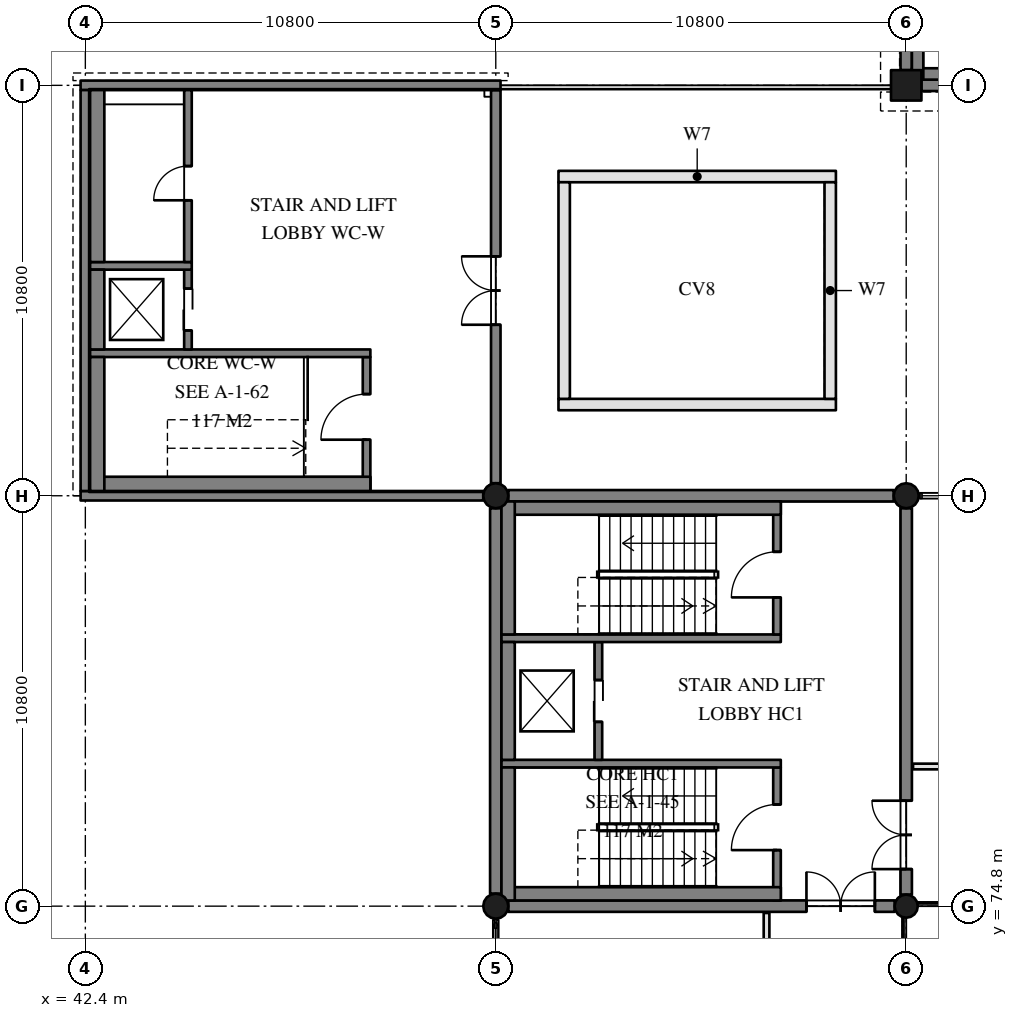
"""IFC4 building model, lengths in metres.
Left out: names, types, materials, properties, quantities, classifications, styles, units other than length and angle.
Written with IfcOpenShell. Run it as: python <this file> out.ifc"""

import sys

from ifc_helpers import new_model, si_unit, direction, frame, frame_2d, origin, origin_2d, place, context, subcontext, project, spatial, rectangle, hollow_circle, extrude, element, fill, save


model = new_model("IFC4")
c1 = context("Model", 3, precision=1e-05, world=origin(), true_north=direction((0.0, 1.0)))
c2 = subcontext(c1, "Body", "Model", "MODEL_VIEW")
j1 = project(units=[si_unit("LENGTHUNIT", "METRE"), si_unit("PLANEANGLEUNIT", "RADIAN")], contexts=[c1])
p1 = place(None, origin())
s1 = spatial("IfcSite", under=j1, at=p1, CompositionType="ELEMENT")
p2 = place(p1, origin())
s2 = spatial("IfcBuilding", under=s1, at=p2, CompositionType="ELEMENT")
p3 = place(p2, frame((0.0, 0.0, 4.8)))
s3 = spatial("IfcBuildingStorey", under=s2, at=p3, CompositionType="ELEMENT", Elevation=4.8)
for number, where, z_axis, x_axis in (
    (1, (53.2, 74.8, 0.0), (0.0, 0.0, 1.0), (1.0, 0.0, 0.0)),
    (2, (53.2, 85.6, 0.0), (0.0, 0.0, 1.0), (1.0, 0.0, 0.0)),
):
    element("IfcColumn", number, at=place(p3, frame(where, z_axis=z_axis, x_axis=x_axis)), inside=s3, PredefinedType="COLUMN", context=c2, shape_type="SweptSolid", body=[
        extrude(hollow_circle(Radius=0.33, WallThickness=0.025, at=origin_2d()), origin(), (0.0, 0.0, 1.0), 3.9),
    ])
p4 = place(p3, frame((64.0, 74.8, 0.0), z_axis=(0.0, 0.0, 1.0), x_axis=(1.0, 0.0, 0.0)))
e3 = element("IfcColumn", 3, at=p4, inside=s3, PredefinedType="COLUMN", context=c2, shape_type="SweptSolid", body=[
    extrude(hollow_circle(Radius=0.305, WallThickness=0.025, at=origin_2d()), origin(), (0.0, 0.0, 1.0), 3.9),
])
p5 = place(p3, frame((64.0, 85.6, 0.0), z_axis=(0.0, 0.0, 1.0), x_axis=(1.0, 0.0, 0.0)))
e4 = element("IfcColumn", 4, at=p5, inside=s3, PredefinedType="COLUMN", context=c2, shape_type="SweptSolid", body=[
    extrude(hollow_circle(Radius=0.33, WallThickness=0.025, at=origin_2d()), origin(), (0.0, 0.0, 1.0), 3.9),
])
p6 = place(p3, frame((64.0, 96.4, 0.0), z_axis=(0.0, 0.0, 1.0), x_axis=(1.0, 0.0, 0.0)))
e5 = element("IfcColumn", 5, at=p6, inside=s3, PredefinedType="COLUMN", context=c2, shape_type="SweptSolid", body=[
    extrude(rectangle(XDim=0.8, YDim=0.8, at=origin_2d()), origin(), (0.0, 0.0, 1.0), 3.9),
])
p7 = place(p3, frame((53.53, 74.8, 0.0), z_axis=(0.0, 0.0, 1.0), x_axis=(1.0, 0.0, 0.0)))
e6 = element("IfcWall", 6, at=p7, inside=s3, PredefinedType="SOLIDWALL", context=c2, shape_type="SweptSolid", body=[
    extrude(rectangle(XDim=10.165, YDim=0.3, at=frame_2d((5.083, 0.0))), origin(), (0.0, 0.0, 1.0), 3.9),
])
p8 = place(p7, frame((7.845, 0.0, 0.0)))
e7 = element("IfcOpeningElement", 7, at=p8, cuts=e6, PredefinedType="OPENING", context=c2, shape_type="SweptSolid", body=[
    extrude(rectangle(XDim=1.8, YDim=2.1, at=frame_2d((0.9, 1.05))), frame((0.0, 0.16, 0.0), z_axis=(0.0, -1.0, 0.0), x_axis=(1.0, 0.0, 0.0)), (0.0, 0.0, 1.0), 0.32),
])
p9 = place(p3, frame((64.0, 75.105, 0.0), z_axis=(0.0, 0.0, 1.0), x_axis=(0.0, 1.0, 0.0)))
e8 = element("IfcWall", 8, at=p9, inside=s3, PredefinedType="SOLIDWALL", context=c2, shape_type="SweptSolid", body=[
    extrude(rectangle(XDim=10.165, YDim=0.3, at=frame_2d((5.083, 0.0))), origin(), (0.0, 0.0, 1.0), 3.9),
])
p10 = place(p9, frame((0.67, 0.0, 0.0)))
e9 = element("IfcOpeningElement", 9, at=p10, cuts=e8, PredefinedType="OPENING", context=c2, shape_type="SweptSolid", body=[
    extrude(rectangle(XDim=1.8, YDim=2.1, at=frame_2d((0.9, 1.05))), frame((0.0, 0.16, 0.0), z_axis=(0.0, -1.0, 0.0), x_axis=(1.0, 0.0, 0.0)), (0.0, 0.0, 1.0), 0.32),
])
p11 = place(p3, frame((63.67, 85.6, 0.0), z_axis=(0.0, 0.0, 1.0), x_axis=(-1.0, 0.0, 0.0)))
e10 = element("IfcWall", 10, at=p11, inside=s3, PredefinedType="SOLIDWALL", context=c2, shape_type="SweptSolid", body=[
    extrude(rectangle(XDim=10.14, YDim=0.3, at=frame_2d((5.07, 0.0))), origin(), (0.0, 0.0, 1.0), 3.9),
])
p12 = place(p3, frame((53.2, 85.27, 0.0), z_axis=(0.0, 0.0, 1.0), x_axis=(0.0, -1.0, 0.0)))
e11 = element("IfcWall", 11, at=p12, inside=s3, PredefinedType="SOLIDWALL", context=c2, shape_type="SweptSolid", body=[
    extrude(rectangle(XDim=10.14, YDim=0.3, at=frame_2d((5.07, 0.0))), origin(), (0.0, 0.0, 1.0), 3.9),
])
p13 = place(p3, frame((42.275, 85.6, 0.0), z_axis=(0.0, 0.0, 1.0), x_axis=(1.0, 0.0, 0.0)))
e12 = element("IfcWall", 12, at=p13, inside=s3, PredefinedType="SOLIDWALL", context=c2, shape_type="SweptSolid", body=[
    extrude(rectangle(XDim=10.595, YDim=0.25, at=frame_2d((5.298, 0.0))), origin(), (0.0, 0.0, 1.0), 3.9),
])
p14 = place(p3, frame((53.2, 85.93, 0.0), z_axis=(0.0, 0.0, 1.0), x_axis=(0.0, 1.0, 0.0)))
e13 = element("IfcWall", 13, at=p14, inside=s3, PredefinedType="SOLIDWALL", context=c2, shape_type="SweptSolid", body=[
    extrude(rectangle(XDim=10.345, YDim=0.25, at=frame_2d((5.172, 0.0))), origin(), (0.0, 0.0, 1.0), 3.9),
])
p15 = place(p14, frame((4.17, 0.0, 0.0)))
e14 = element("IfcOpeningElement", 14, at=p15, cuts=e13, PredefinedType="OPENING", context=c2, shape_type="SweptSolid", body=[
    extrude(rectangle(XDim=1.8, YDim=2.1, at=frame_2d((0.9, 1.05))), frame((0.0, 0.135, 0.0), z_axis=(0.0, -1.0, 0.0), x_axis=(1.0, 0.0, 0.0)), (0.0, 0.0, 1.0), 0.27),
])
p16 = place(p3, frame((53.325, 96.4, 0.0), z_axis=(0.0, 0.0, 1.0), x_axis=(-1.0, 0.0, 0.0)))
e15 = element("IfcWall", 15, at=p16, inside=s3, PredefinedType="SOLIDWALL", context=c2, shape_type="SweptSolid", body=[
    extrude(rectangle(XDim=11.05, YDim=0.25, at=frame_2d((5.525, 0.0))), origin(), (0.0, 0.0, 1.0), 3.9),
])
p17 = place(p3, frame((42.4, 96.275, 0.0), z_axis=(0.0, 0.0, 1.0), x_axis=(0.0, -1.0, 0.0)))
e16 = element("IfcWall", 16, at=p17, inside=s3, PredefinedType="SOLIDWALL", context=c2, shape_type="SweptSolid", body=[
    extrude(rectangle(XDim=10.55, YDim=0.25, at=frame_2d((5.275, 0.0))), origin(), (0.0, 0.0, 1.0), 3.9),
])
for number, where, z_axis, x_axis in (
    (17, (64.4, 96.4, 0.0), (0.0, 0.0, 1.0), (1.0, 0.0, 0.0)),
    (18, (64.0, 106.8, 0.0), (0.0, 0.0, 1.0), (0.0, -1.0, 0.0)),
):
    element("IfcWall", number, at=place(p3, frame(where, z_axis=z_axis, x_axis=x_axis)), inside=s3, PredefinedType="SOLIDWALL", context=c2, shape_type="SweptSolid", body=[
        extrude(rectangle(XDim=10.0, YDim=0.3, at=frame_2d((5.0, 0.0))), origin(), (0.0, 0.0, 1.0), 3.9),
    ])
for number, where, z_axis, x_axis in (
    (19, (54.85, 88.0, 0.0), (0.0, 0.0, 1.0), (1.0, 0.0, 0.0)),
    (20, (62.15, 94.0, 0.0), (0.0, 0.0, 1.0), (-1.0, 0.0, 0.0)),
):
    element("IfcWall", number, at=place(p3, frame(where, z_axis=z_axis, x_axis=x_axis)), inside=s3, PredefinedType="PARAPET", context=c2, shape_type="SweptSolid", body=[
        extrude(rectangle(XDim=7.3, YDim=0.3, at=frame_2d((3.65, 0.0))), origin(), (0.0, 0.0, 1.0), 0.6),
    ])
for number, where, z_axis, x_axis in (
    (21, (55.0, 93.85, 0.0), (0.0, 0.0, 1.0), (0.0, -1.0, 0.0)),
    (22, (62.0, 88.15, 0.0), (0.0, 0.0, 1.0), (0.0, 1.0, 0.0)),
):
    element("IfcWall", number, at=place(p3, frame(where, z_axis=z_axis, x_axis=x_axis)), inside=s3, PredefinedType="PARAPET", context=c2, shape_type="SweptSolid", body=[
        extrude(rectangle(XDim=5.7, YDim=0.3, at=frame_2d((2.85, 0.0))), origin(), (0.0, 0.0, 1.0), 0.6),
    ])
p18 = place(p3, frame((60.6, 74.95, 0.0), z_axis=(0.0, 0.0, 1.0), x_axis=(0.0, 1.0, 0.0)))
e23 = element("IfcWall", 23, at=p18, inside=s3, PredefinedType="SOLIDWALL", context=c2, shape_type="SweptSolid", body=[
    extrude(rectangle(XDim=3.5, YDim=0.2, at=frame_2d((1.75, 0.0))), origin(), (0.0, 0.0, 1.0), 3.6),
])
p19 = place(p18, frame((1.325, 0.0, 0.0)))
e24 = element("IfcOpeningElement", 24, at=p19, cuts=e23, PredefinedType="OPENING", context=c2, shape_type="SweptSolid", body=[
    extrude(rectangle(XDim=1.2, YDim=2.1, at=frame_2d((0.6, 1.05))), frame((0.0, 0.11, 0.0), z_axis=(0.0, -1.0, 0.0), x_axis=(1.0, 0.0, 0.0)), (0.0, 0.0, 1.0), 0.22),
])
p20 = place(p3, frame((60.7, 78.55, 0.0), z_axis=(0.0, 0.0, 1.0), x_axis=(-1.0, 0.0, 0.0)))
e25 = element("IfcWall", 25, at=p20, inside=s3, PredefinedType="SOLIDWALL", context=c2, shape_type="SweptSolid", body=[
    extrude(rectangle(XDim=7.35, YDim=0.2, at=frame_2d((3.675, 0.0))), origin(), (0.0, 0.0, 1.0), 3.6),
])
p21 = place(p3, frame((55.9, 78.65, 0.0), z_axis=(0.0, 0.0, 1.0), x_axis=(0.0, 1.0, 0.0)))
e26 = element("IfcWall", 26, at=p21, inside=s3, PredefinedType="SOLIDWALL", context=c2, shape_type="SweptSolid", body=[
    extrude(rectangle(XDim=3.1, YDim=0.2, at=frame_2d((1.55, 0.0))), origin(), (0.0, 0.0, 1.0), 3.6),
])
p22 = place(p21, frame((1.0, 0.0, 0.0)))
e27 = element("IfcOpeningElement", 27, at=p22, cuts=e26, PredefinedType="OPENING", context=c2, shape_type="SweptSolid", body=[
    extrude(rectangle(XDim=1.1, YDim=2.1, at=frame_2d((0.55, 1.05))), frame((0.0, 0.11, 0.0), z_axis=(0.0, -1.0, 0.0), x_axis=(1.0, 0.0, 0.0)), (0.0, 0.0, 1.0), 0.22),
])
p23 = place(p3, frame((60.7, 81.85, 0.0), z_axis=(0.0, 0.0, 1.0), x_axis=(-1.0, 0.0, 0.0)))
e28 = element("IfcWall", 28, at=p23, inside=s3, PredefinedType="SOLIDWALL", context=c2, shape_type="SweptSolid", body=[
    extrude(rectangle(XDim=7.35, YDim=0.2, at=frame_2d((3.675, 0.0))), origin(), (0.0, 0.0, 1.0), 3.6),
])
p24 = place(p3, frame((60.6, 81.95, 0.0), z_axis=(0.0, 0.0, 1.0), x_axis=(0.0, 1.0, 0.0)))
e29 = element("IfcWall", 29, at=p24, inside=s3, PredefinedType="SOLIDWALL", context=c2, shape_type="SweptSolid", body=[
    extrude(rectangle(XDim=3.5, YDim=0.2, at=frame_2d((1.75, 0.0))), origin(), (0.0, 0.0, 1.0), 3.6),
])
p25 = place(p24, frame((0.975, 0.0, 0.0)))
e30 = element("IfcOpeningElement", 30, at=p25, cuts=e29, PredefinedType="OPENING", context=c2, shape_type="SweptSolid", body=[
    extrude(rectangle(XDim=1.2, YDim=2.1, at=frame_2d((0.6, 1.05))), frame((0.0, 0.11, 0.0), z_axis=(0.0, -1.0, 0.0), x_axis=(1.0, 0.0, 0.0)), (0.0, 0.0, 1.0), 0.22),
])
p26 = place(p3, frame((60.7, 75.125, -0.4), z_axis=(0.0, 0.0, 1.0), x_axis=(-1.0, 0.0, 0.0)))
e31 = element("IfcWall", 31, at=p26, inside=s3, PredefinedType="SOLIDWALL", context=c2, shape_type="SweptSolid", body=[
    extrude(rectangle(XDim=7.35, YDim=0.35, at=frame_2d((3.675, 0.0))), origin(), (0.0, 0.0, 1.0), 4.0),
])
p27 = place(p3, frame((53.525, 74.95, -0.4), z_axis=(0.0, 0.0, 1.0), x_axis=(0.0, 1.0, 0.0)))
e32 = element("IfcWall", 32, at=p27, inside=s3, PredefinedType="SOLIDWALL", context=c2, shape_type="SweptSolid", body=[
    extrude(rectangle(XDim=3.5, YDim=0.35, at=frame_2d((1.75, 0.0))), origin(), (0.0, 0.0, 1.0), 4.0),
])
p28 = place(p3, frame((60.7, 85.275, -0.4), z_axis=(0.0, 0.0, 1.0), x_axis=(-1.0, 0.0, 0.0)))
e33 = element("IfcWall", 33, at=p28, inside=s3, PredefinedType="SOLIDWALL", context=c2, shape_type="SweptSolid", body=[
    extrude(rectangle(XDim=7.35, YDim=0.35, at=frame_2d((3.675, 0.0))), origin(), (0.0, 0.0, 1.0), 4.0),
])
p29 = place(p3, frame((53.525, 81.95, -0.4), z_axis=(0.0, 0.0, 1.0), x_axis=(0.0, 1.0, 0.0)))
e34 = element("IfcWall", 34, at=p29, inside=s3, PredefinedType="SOLIDWALL", context=c2, shape_type="SweptSolid", body=[
    extrude(rectangle(XDim=3.5, YDim=0.35, at=frame_2d((1.75, 0.0))), origin(), (0.0, 0.0, 1.0), 4.0),
])
p30 = place(p3, frame((53.525, 78.65, -0.4), z_axis=(0.0, 0.0, 1.0), x_axis=(0.0, 1.0, 0.0)))
e35 = element("IfcWall", 35, at=p30, inside=s3, PredefinedType="SOLIDWALL", context=c2, shape_type="SweptSolid", body=[
    extrude(rectangle(XDim=3.1, YDim=0.35, at=frame_2d((1.55, 0.0))), origin(), (0.0, 0.0, 1.0), 4.0),
])
p31 = place(p3, frame((49.8, 85.725, 0.0), z_axis=(0.0, 0.0, 1.0), x_axis=(0.0, 1.0, 0.0)))
e36 = element("IfcWall", 36, at=p31, inside=s3, PredefinedType="SOLIDWALL", context=c2, shape_type="SweptSolid", body=[
    extrude(rectangle(XDim=3.525, YDim=0.2, at=frame_2d((1.762, 0.0))), origin(), (0.0, 0.0, 1.0), 3.6),
])
p32 = place(p31, frame((1.35, 0.0, 0.0)))
e37 = element("IfcOpeningElement", 37, at=p32, cuts=e36, PredefinedType="OPENING", context=c2, shape_type="SweptSolid", body=[
    extrude(rectangle(XDim=1.2, YDim=2.1, at=frame_2d((0.6, 1.05))), frame((0.0, 0.11, 0.0), z_axis=(0.0, -1.0, 0.0), x_axis=(1.0, 0.0, 0.0)), (0.0, 0.0, 1.0), 0.22),
])
p33 = place(p3, frame((49.9, 89.35, 0.0), z_axis=(0.0, 0.0, 1.0), x_axis=(-1.0, 0.0, 0.0)))
e38 = element("IfcWall", 38, at=p33, inside=s3, PredefinedType="SOLIDWALL", context=c2, shape_type="SweptSolid", body=[
    extrude(rectangle(XDim=7.375, YDim=0.2, at=frame_2d((3.688, 0.0))), origin(), (0.0, 0.0, 1.0), 3.6),
])
p34 = place(p3, frame((45.1, 89.45, 0.0), z_axis=(0.0, 0.0, 1.0), x_axis=(0.0, 1.0, 0.0)))
e39 = element("IfcWall", 39, at=p34, inside=s3, PredefinedType="SOLIDWALL", context=c2, shape_type="SweptSolid", body=[
    extrude(rectangle(XDim=2.1, YDim=0.2, at=frame_2d((1.05, 0.0))), origin(), (0.0, 0.0, 1.0), 3.6),
])
p35 = place(p34, frame((0.5, 0.0, 0.0)))
e40 = element("IfcOpeningElement", 40, at=p35, cuts=e39, PredefinedType="OPENING", context=c2, shape_type="SweptSolid", body=[
    extrude(rectangle(XDim=1.1, YDim=2.1, at=frame_2d((0.55, 1.05))), frame((0.0, 0.11, 0.0), z_axis=(0.0, -1.0, 0.0), x_axis=(1.0, 0.0, 0.0)), (0.0, 0.0, 1.0), 0.22),
])
p36 = place(p3, frame((45.2, 91.65, 0.0), z_axis=(0.0, 0.0, 1.0), x_axis=(-1.0, 0.0, 0.0)))
e41 = element("IfcWall", 41, at=p36, inside=s3, PredefinedType="SOLIDWALL", context=c2, shape_type="SweptSolid", body=[
    extrude(rectangle(XDim=2.675, YDim=0.2, at=frame_2d((1.337, 0.0))), origin(), (0.0, 0.0, 1.0), 3.6),
])
p37 = place(p3, frame((45.1, 91.75, 0.0), z_axis=(0.0, 0.0, 1.0), x_axis=(0.0, 1.0, 0.0)))
e42 = element("IfcWall", 42, at=p37, inside=s3, PredefinedType="SOLIDWALL", context=c2, shape_type="SweptSolid", body=[
    extrude(rectangle(XDim=4.525, YDim=0.2, at=frame_2d((2.262, 0.0))), origin(), (0.0, 0.0, 1.0), 3.6),
])
p38 = place(p37, frame((1.625, 0.0, 0.0)))
e43 = element("IfcOpeningElement", 43, at=p38, cuts=e42, PredefinedType="OPENING", context=c2, shape_type="SweptSolid", body=[
    extrude(rectangle(XDim=0.9, YDim=2.1, at=frame_2d((0.45, 1.05))), frame((0.0, 0.11, 0.0), z_axis=(0.0, -1.0, 0.0), x_axis=(1.0, 0.0, 0.0)), (0.0, 0.0, 1.0), 0.22),
])
p39 = place(p3, frame((49.9, 85.913, -0.4), z_axis=(0.0, 0.0, 1.0), x_axis=(-1.0, 0.0, 0.0)))
e44 = element("IfcWall", 44, at=p39, inside=s3, PredefinedType="SOLIDWALL", context=c2, shape_type="SweptSolid", body=[
    extrude(rectangle(XDim=7.375, YDim=0.375, at=frame_2d((3.688, 0.0))), origin(), (0.0, 0.0, 1.0), 4.0),
])
p40 = place(p3, frame((42.712, 85.725, -0.4), z_axis=(0.0, 0.0, 1.0), x_axis=(0.0, 1.0, 0.0)))
e45 = element("IfcWall", 45, at=p40, inside=s3, PredefinedType="SOLIDWALL", context=c2, shape_type="SweptSolid", body=[
    extrude(rectangle(XDim=3.525, YDim=0.375, at=frame_2d((1.762, 0.0))), origin(), (0.0, 0.0, 1.0), 4.0),
])
p41 = place(p3, frame((42.712, 89.45, -0.4), z_axis=(0.0, 0.0, 1.0), x_axis=(0.0, 1.0, 0.0)))
e46 = element("IfcWall", 46, at=p41, inside=s3, PredefinedType="SOLIDWALL", context=c2, shape_type="SweptSolid", body=[
    extrude(rectangle(XDim=2.1, YDim=0.375, at=frame_2d((1.05, 0.0))), origin(), (0.0, 0.0, 1.0), 4.0),
])
p42 = place(p3, frame((42.712, 91.75, -0.4), z_axis=(0.0, 0.0, 1.0), x_axis=(0.0, 1.0, 0.0)))
e47 = element("IfcWall", 47, at=p42, inside=s3, PredefinedType="SOLIDWALL", context=c2, shape_type="SweptSolid", body=[
    extrude(rectangle(XDim=4.525, YDim=0.375, at=frame_2d((2.262, 0.0))), origin(), (0.0, 0.0, 1.0), 4.0),
])
p43 = place(p3, frame((70.85, 96.7, 0.0), z_axis=(0.0, 0.0, 1.0), x_axis=(-1.0, 0.0, 0.0)))
e48 = element("IfcWall", 48, at=p43, inside=s3, PredefinedType="SOLIDWALL", context=c2, shape_type="SweptSolid", body=[
    extrude(rectangle(XDim=6.7, YDim=0.3, at=frame_2d((3.35, 0.0))), origin(), (0.0, 0.0, 1.0), 3.6),
])
p44 = place(p3, frame((64.3, 96.55, 0.0), z_axis=(0.0, 0.0, 1.0), x_axis=(0.0, 1.0, 0.0)))
e49 = element("IfcWall", 49, at=p44, inside=s3, PredefinedType="SOLIDWALL", context=c2, shape_type="SweptSolid", body=[
    extrude(rectangle(XDim=3.45, YDim=0.3, at=frame_2d((1.725, 0.0))), origin(), (0.0, 0.0, 1.0), 3.6),
])
p45 = place(p3, frame((64.18, 78.475, 0.0), z_axis=(0.0, 0.0, 1.0), x_axis=(1.0, 0.0, 0.0)))
e50 = element("IfcWall", 50, at=p45, inside=s3, PredefinedType="PARTITIONING", context=c2, shape_type="SweptSolid", body=[
    extrude(rectangle(XDim=21.42, YDim=0.15, at=frame_2d((10.71, 0.0))), origin(), (0.0, 0.0, 1.0), 3.1),
])
p46 = place(p45, frame((9.81, 0.0, 0.0)))
e51 = element("IfcOpeningElement", 51, at=p46, cuts=e50, PredefinedType="OPENING", context=c2, shape_type="SweptSolid", body=[
    extrude(rectangle(XDim=1.8, YDim=2.1, at=frame_2d((0.9, 1.05))), frame((0.0, 0.085, 0.0), z_axis=(0.0, -1.0, 0.0), x_axis=(1.0, 0.0, 0.0)), (0.0, 0.0, 1.0), 0.17),
])
p47 = place(p3, frame((60.325, 64.0, 0.0), z_axis=(0.0, 0.0, 1.0), x_axis=(0.0, 1.0, 0.0)))
e52 = element("IfcWall", 52, at=p47, inside=s3, PredefinedType="PARTITIONING", context=c2, shape_type="SweptSolid", body=[
    extrude(rectangle(XDim=10.62, YDim=0.15, at=frame_2d((5.31, 0.0))), origin(), (0.0, 0.0, 1.0), 7.574),
])
p48 = place(p47, frame((4.81, 0.0, 0.0)))
e53 = element("IfcOpeningElement", 53, at=p48, cuts=e52, PredefinedType="OPENING", context=c2, shape_type="SweptSolid", body=[
    extrude(rectangle(XDim=1.0, YDim=2.1, at=frame_2d((0.5, 1.05))), frame((0.0, 0.085, 0.0), z_axis=(0.0, -1.0, 0.0), x_axis=(1.0, 0.0, 0.0)), (0.0, 0.0, 1.0), 0.17),
])
p49 = place(p22, frame((1.1, 0.0, 0.0), z_axis=(0.0, 0.0, 1.0), x_axis=(-1.0, 0.0, 0.0)))
e54 = element("IfcDoor", 54, at=p49, inside=s3, OperationType="DOUBLE_DOOR_SLIDING", PredefinedType="DOOR", context=c2, shape_type="SweptSolid", body=[
    extrude(rectangle(XDim=1.1, YDim=2.1, at=frame_2d((0.55, 1.05))), frame((0.0, 0.025, 0.0), z_axis=(0.0, -1.0, 0.0), x_axis=(1.0, 0.0, 0.0)), (0.0, 0.0, 1.0), 0.05),
])
fill(e27, e54)
p50 = place(p19, frame((1.2, 0.0, 0.0), z_axis=(0.0, 0.0, 1.0), x_axis=(-1.0, 0.0, 0.0)))
e55 = element("IfcDoor", 55, at=p50, inside=s3, OperationType="SINGLE_SWING_LEFT", PredefinedType="DOOR", context=c2, shape_type="SweptSolid", body=[
    extrude(rectangle(XDim=1.2, YDim=2.1, at=frame_2d((0.6, 1.05))), frame((0.0, 0.025, 0.0), z_axis=(0.0, -1.0, 0.0), x_axis=(1.0, 0.0, 0.0)), (0.0, 0.0, 1.0), 0.05),
])
fill(e24, e55)
p51 = place(p25, frame((1.2, 0.0, 0.0), z_axis=(0.0, 0.0, 1.0), x_axis=(-1.0, 0.0, 0.0)))
e56 = element("IfcDoor", 56, at=p51, inside=s3, OperationType="SINGLE_SWING_RIGHT", PredefinedType="DOOR", context=c2, shape_type="SweptSolid", body=[
    extrude(rectangle(XDim=1.2, YDim=2.1, at=frame_2d((0.6, 1.05))), frame((0.0, 0.025, 0.0), z_axis=(0.0, -1.0, 0.0), x_axis=(1.0, 0.0, 0.0)), (0.0, 0.0, 1.0), 0.05),
])
fill(e30, e56)
p52 = place(p10, frame((1.8, 0.0, 0.0), z_axis=(0.0, 0.0, 1.0), x_axis=(-1.0, 0.0, 0.0)))
e57 = element("IfcDoor", 57, at=p52, inside=s3, OperationType="DOUBLE_DOOR_DOUBLE_SWING", PredefinedType="DOOR", context=c2, shape_type="SweptSolid", body=[
    extrude(rectangle(XDim=1.8, YDim=2.1, at=frame_2d((0.9, 1.05))), frame((0.0, 0.025, 0.0), z_axis=(0.0, -1.0, 0.0), x_axis=(1.0, 0.0, 0.0)), (0.0, 0.0, 1.0), 0.05),
])
fill(e9, e57)
p53 = place(p8, frame((1.8, 0.0, 0.0), z_axis=(0.0, 0.0, 1.0), x_axis=(-1.0, 0.0, 0.0)))
e58 = element("IfcDoor", 58, at=p53, inside=s3, OperationType="DOUBLE_DOOR_DOUBLE_SWING", PredefinedType="DOOR", context=c2, shape_type="SweptSolid", body=[
    extrude(rectangle(XDim=1.8, YDim=2.1, at=frame_2d((0.9, 1.05))), frame((0.0, 0.025, 0.0), z_axis=(0.0, -1.0, 0.0), x_axis=(1.0, 0.0, 0.0)), (0.0, 0.0, 1.0), 0.05),
])
fill(e7, e58)
p54 = place(p35, frame((1.1, 0.0, 0.0), z_axis=(0.0, 0.0, 1.0), x_axis=(-1.0, 0.0, 0.0)))
e59 = element("IfcDoor", 59, at=p54, inside=s3, OperationType="DOUBLE_DOOR_SLIDING", PredefinedType="DOOR", context=c2, shape_type="SweptSolid", body=[
    extrude(rectangle(XDim=1.1, YDim=2.1, at=frame_2d((0.55, 1.05))), frame((0.0, 0.025, 0.0), z_axis=(0.0, -1.0, 0.0), x_axis=(1.0, 0.0, 0.0)), (0.0, 0.0, 1.0), 0.05),
])
fill(e40, e59)
p55 = place(p32, frame((1.2, 0.0, 0.0), z_axis=(0.0, 0.0, 1.0), x_axis=(-1.0, 0.0, 0.0)))
e60 = element("IfcDoor", 60, at=p55, inside=s3, OperationType="SINGLE_SWING_LEFT", PredefinedType="DOOR", context=c2, shape_type="SweptSolid", body=[
    extrude(rectangle(XDim=1.2, YDim=2.1, at=frame_2d((0.6, 1.05))), frame((0.0, 0.025, 0.0), z_axis=(0.0, -1.0, 0.0), x_axis=(1.0, 0.0, 0.0)), (0.0, 0.0, 1.0), 0.05),
])
fill(e37, e60)
p56 = place(p38, frame((0.9, 0.0, 0.0), z_axis=(0.0, 0.0, 1.0), x_axis=(-1.0, 0.0, 0.0)))
e61 = element("IfcDoor", 61, at=p56, inside=s3, OperationType="SINGLE_SWING_RIGHT", PredefinedType="DOOR", context=c2, shape_type="SweptSolid", body=[
    extrude(rectangle(XDim=0.9, YDim=2.1, at=frame_2d((0.45, 1.05))), frame((0.0, 0.025, 0.0), z_axis=(0.0, -1.0, 0.0), x_axis=(1.0, 0.0, 0.0)), (0.0, 0.0, 1.0), 0.05),
])
fill(e43, e61)
p57 = place(p15, frame((1.8, 0.0, 0.0), z_axis=(0.0, 0.0, 1.0), x_axis=(-1.0, 0.0, 0.0)))
e62 = element("IfcDoor", 62, at=p57, inside=s3, OperationType="DOUBLE_DOOR_DOUBLE_SWING", PredefinedType="DOOR", context=c2, shape_type="SweptSolid", body=[
    extrude(rectangle(XDim=1.8, YDim=2.1, at=frame_2d((0.9, 1.05))), frame((0.0, 0.025, 0.0), z_axis=(0.0, -1.0, 0.0), x_axis=(1.0, 0.0, 0.0)), (0.0, 0.0, 1.0), 0.05),
])
fill(e14, e62)
save(model, sys.argv[1])
